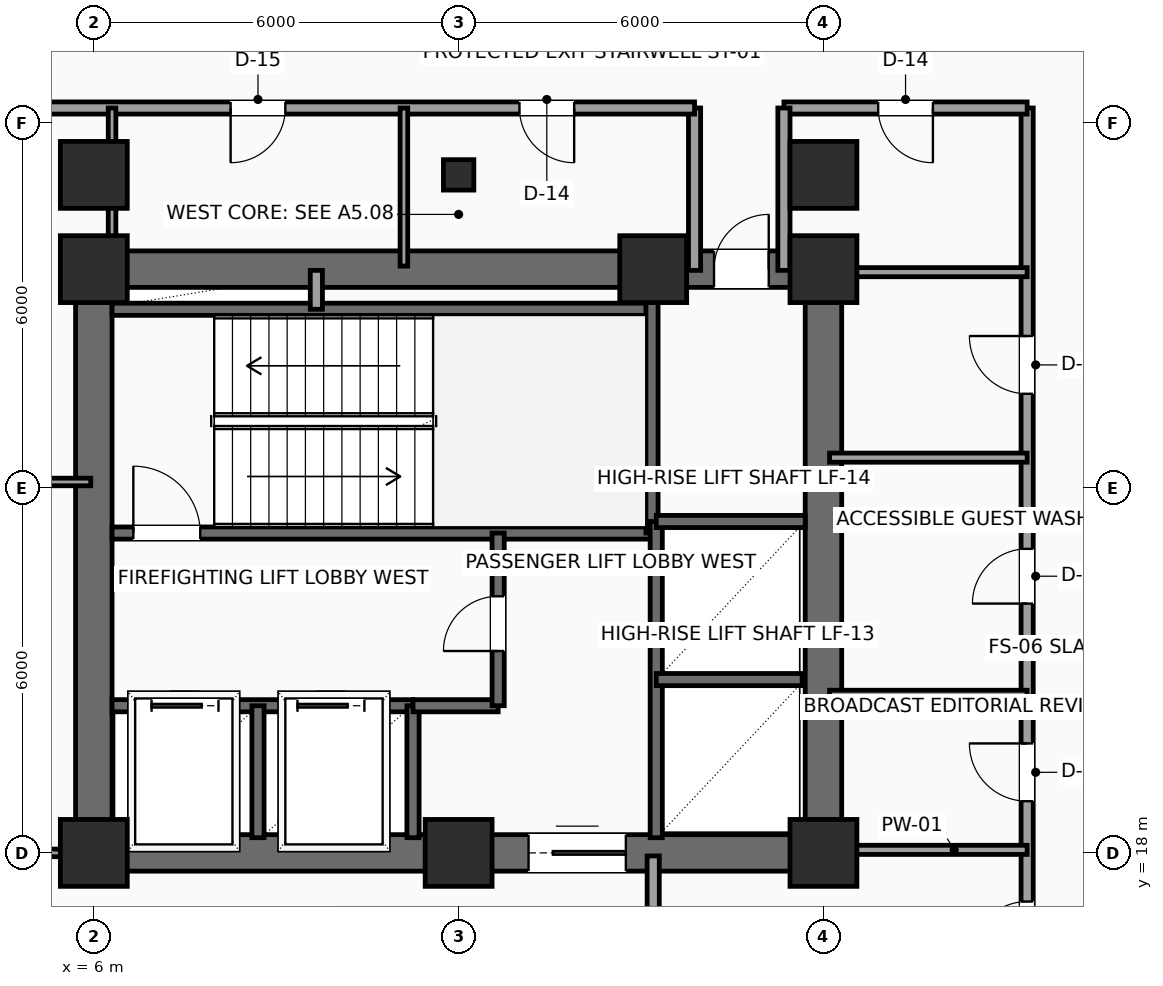
"""IFC4 building model, lengths in metres.
Left out: names, types, materials, properties, quantities, classifications, styles, units other than length and angle.
Written with IfcOpenShell. Run it as: python <this file> out.ifc"""

import sys

from ifc_helpers import new_model, si_unit, direction, frame, frame_2d, origin, origin_2d, place, context, subcontext, project, spatial, rectangle, hollow_rectangle, extrude, element, fill, save


model = new_model("IFC4")
c1 = context("Model", 3, precision=1e-05, world=origin(), true_north=direction((0.0, 1.0)))
c2 = subcontext(c1, "Body", "Model", "MODEL_VIEW")
j1 = project(units=[si_unit("LENGTHUNIT", "METRE"), si_unit("PLANEANGLEUNIT", "RADIAN")], contexts=[c1])
p1 = place(None, origin())
s1 = spatial("IfcSite", under=j1, at=p1, CompositionType="ELEMENT")
p2 = place(p1, origin())
s2 = spatial("IfcBuilding", under=s1, at=p2, CompositionType="ELEMENT")
p3 = place(p2, frame((0.0, 0.0, 149.4)))
s3 = spatial("IfcBuildingStorey", under=s2, at=p3, CompositionType="ELEMENT", Elevation=149.4)
for number, where, z_axis, x_axis in (
    (1, (6.0, 18.0, 0.0), (0.0, 0.0, 1.0), (1.0, 0.0, 0.0)),
    (2, (12.0, 18.0, 0.0), (0.0, 0.0, 1.0), (1.0, 0.0, 0.0)),
    (3, (18.0, 18.0, 0.0), (0.0, 0.0, 1.0), (1.0, 0.0, 0.0)),
    (4, (6.0, 27.6, 0.0), (0.0, 0.0, 1.0), (1.0, 0.0, 0.0)),
    (5, (15.2, 27.6, 0.0), (0.0, 0.0, 1.0), (1.0, 0.0, 0.0)),
    (6, (18.0, 27.6, 0.0), (0.0, 0.0, 1.0), (1.0, 0.0, 0.0)),
    (7, (6.0, 29.15, 0.0), (0.0, 0.0, 1.0), (1.0, 0.0, 0.0)),
):
    element("IfcColumn", number, at=place(p3, frame(where, z_axis=z_axis, x_axis=x_axis)), inside=s3, PredefinedType="COLUMN", context=c2, shape_type="SweptSolid", body=[
        extrude(rectangle(XDim=1.1, YDim=1.1, at=origin_2d()), origin(), (0.0, 0.0, 1.0), 3.75),
    ])
p4 = place(p3, frame((12.0, 29.15, 0.0), z_axis=(0.0, 0.0, 1.0), x_axis=(1.0, 0.0, 0.0)))
e8 = element("IfcColumn", 8, at=p4, inside=s3, PredefinedType="COLUMN", context=c2, shape_type="SweptSolid", body=[
    extrude(hollow_rectangle(XDim=0.5, YDim=0.5, WallThickness=0.025, InnerFilletRadius=0.025, OuterFilletRadius=0.04, at=origin_2d()), origin(), (0.0, 0.0, 1.0), 3.75),
])
p5 = place(p3, frame((18.0, 29.15, 0.0), z_axis=(0.0, 0.0, 1.0), x_axis=(1.0, 0.0, 0.0)))
e9 = element("IfcColumn", 9, at=p5, inside=s3, PredefinedType="COLUMN", context=c2, shape_type="SweptSolid", body=[
    extrude(rectangle(XDim=1.1, YDim=1.1, at=origin_2d()), origin(), (0.0, 0.0, 1.0), 3.75),
])
p6 = place(p3, frame((6.0, 18.0, 0.0), z_axis=(0.0, 0.0, 1.0), x_axis=(1.0, 0.0, 0.0)))
e10 = element("IfcWall", 10, at=p6, inside=s3, PredefinedType="SHEAR", context=c2, shape_type="SweptSolid", body=[
    extrude(rectangle(XDim=12.0, YDim=0.6, at=frame_2d((6.0, 0.0))), origin(), (0.0, 0.0, 1.0), 3.525),
])
p7 = place(p6, frame((7.15, 0.0, 0.0)))
e11 = element("IfcOpeningElement", 11, at=p7, cuts=e10, PredefinedType="OPENING", context=c2, shape_type="SweptSolid", body=[
    extrude(rectangle(XDim=1.6, YDim=2.3, at=frame_2d((0.8, 1.15))), frame((0.0, 0.31, 0.0), z_axis=(0.0, -1.0, 0.0), x_axis=(1.0, 0.0, 0.0)), (0.0, 0.0, 1.0), 0.62),
])
p8 = place(p3, frame((6.0, 27.6, 0.0), z_axis=(0.0, 0.0, 1.0), x_axis=(1.0, 0.0, 0.0)))
e12 = element("IfcWall", 12, at=p8, inside=s3, PredefinedType="SHEAR", context=c2, shape_type="SweptSolid", body=[
    extrude(rectangle(XDim=12.0, YDim=0.6, at=frame_2d((6.0, 0.0))), origin(), (0.0, 0.0, 1.0), 3.525),
])
p9 = place(p8, frame((10.2, 0.0, 0.0)))
e13 = element("IfcOpeningElement", 13, at=p9, cuts=e12, PredefinedType="OPENING", context=c2, shape_type="SweptSolid", body=[
    extrude(rectangle(XDim=0.9, YDim=2.15, at=frame_2d((0.45, 1.075))), frame((0.0, 0.31, 0.0), z_axis=(0.0, -1.0, 0.0), x_axis=(1.0, 0.0, 0.0)), (0.0, 0.0, 1.0), 0.62),
])
for number, where, z_axis, x_axis in (
    (14, (6.0, 18.0, 0.0), (0.0, 0.0, 1.0), (0.0, 1.0, 0.0)),
    (15, (18.0, 18.0, 0.0), (0.0, 0.0, 1.0), (0.0, 1.0, 0.0)),
):
    element("IfcWall", number, at=place(p3, frame(where, z_axis=z_axis, x_axis=x_axis)), inside=s3, PredefinedType="SHEAR", context=c2, shape_type="SweptSolid", body=[
        extrude(rectangle(XDim=9.6, YDim=0.6, at=frame_2d((4.8, 0.0))), origin(), (0.0, 0.0, 1.0), 3.525),
    ])
p10 = place(p3, frame((6.3, 23.26, 0.0), z_axis=(0.0, 0.0, 1.0), x_axis=(1.0, 0.0, 0.0)))
e16 = element("IfcWall", 16, at=p10, inside=s3, PredefinedType="SHEAR", context=c2, shape_type="SweptSolid", body=[
    extrude(rectangle(XDim=8.88, YDim=0.2, at=frame_2d((4.44, 0.0))), origin(), (0.0, 0.0, 1.0), 3.525),
])
p11 = place(p10, frame((0.35, 0.0, 0.0)))
e17 = element("IfcOpeningElement", 17, at=p11, cuts=e16, PredefinedType="OPENING", context=c2, shape_type="SweptSolid", body=[
    extrude(rectangle(XDim=1.1, YDim=2.2, at=frame_2d((0.55, 1.1))), frame((0.0, 0.11, 0.0), z_axis=(0.0, -1.0, 0.0), x_axis=(1.0, 0.0, 0.0)), (0.0, 0.0, 1.0), 0.22),
])
p12 = place(p3, frame((6.3, 26.94, 0.0), z_axis=(0.0, 0.0, 1.0), x_axis=(1.0, 0.0, 0.0)))
e18 = element("IfcWall", 18, at=p12, inside=s3, PredefinedType="SHEAR", context=c2, shape_type="SweptSolid", body=[
    extrude(rectangle(XDim=8.88, YDim=0.2, at=frame_2d((4.44, 0.0))), origin(), (0.0, 0.0, 1.0), 3.525),
])
p13 = place(p3, frame((15.18, 23.26, 0.0), z_axis=(0.0, 0.0, 1.0), x_axis=(0.0, 1.0, 0.0)))
e19 = element("IfcWall", 19, at=p13, inside=s3, PredefinedType="SHEAR", context=c2, shape_type="SweptSolid", body=[
    extrude(rectangle(XDim=4.04, YDim=0.2, at=frame_2d((2.02, 0.0))), origin(), (0.0, 0.0, 1.0), 3.525),
])
p14 = place(p3, frame((6.3, 20.42, 0.0), z_axis=(0.0, 0.0, 1.0), x_axis=(1.0, 0.0, 0.0)))
e20 = element("IfcWall", 20, at=p14, inside=s3, PredefinedType="SHEAR", context=c2, shape_type="SweptSolid", body=[
    extrude(rectangle(XDim=4.95, YDim=0.2, at=frame_2d((2.475, 0.0))), origin(), (0.0, 0.0, 1.0), 3.525),
])
p15 = place(p14, frame((0.65, 0.0, 0.0)))
e21 = element("IfcOpeningElement", 21, at=p15, cuts=e20, PredefinedType="OPENING", context=c2, shape_type="SweptSolid", body=[
    extrude(rectangle(XDim=1.1, YDim=2.2, at=frame_2d((0.55, 1.1))), frame((0.0, 0.11, 0.0), z_axis=(0.0, -1.0, 0.0), x_axis=(1.0, 0.0, 0.0)), (0.0, 0.0, 1.0), 0.22),
])
p16 = place(p14, frame((3.05, 0.0, 0.0)))
e22 = element("IfcOpeningElement", 22, at=p16, cuts=e20, PredefinedType="OPENING", context=c2, shape_type="SweptSolid", body=[
    extrude(rectangle(XDim=1.1, YDim=2.2, at=frame_2d((0.55, 1.1))), frame((0.0, 0.11, 0.0), z_axis=(0.0, -1.0, 0.0), x_axis=(1.0, 0.0, 0.0)), (0.0, 0.0, 1.0), 0.22),
])
for number, where, z_axis, x_axis in (
    (23, (8.7, 18.25, 0.0), (0.0, 0.0, 1.0), (0.0, 1.0, 0.0)),
    (24, (11.25, 18.25, 0.0), (0.0, 0.0, 1.0), (0.0, 1.0, 0.0)),
):
    element("IfcWall", number, at=place(p3, frame(where, z_axis=z_axis, x_axis=x_axis)), inside=s3, PredefinedType="SHEAR", context=c2, shape_type="SweptSolid", body=[
        extrude(rectangle(XDim=2.17, YDim=0.2, at=frame_2d((1.085, 0.0))), origin(), (0.0, 0.0, 1.0), 3.525),
    ])
p17 = place(p3, frame((11.25, 20.42, 0.0), z_axis=(0.0, 0.0, 1.0), x_axis=(1.0, 0.0, 0.0)))
e25 = element("IfcWall", 25, at=p17, inside=s3, PredefinedType="SHEAR", context=c2, shape_type="SweptSolid", body=[
    extrude(rectangle(XDim=1.4, YDim=0.2, at=frame_2d((0.7, 0.0))), origin(), (0.0, 0.0, 1.0), 3.525),
])
p18 = place(p3, frame((12.65, 20.42, 0.0), z_axis=(0.0, 0.0, 1.0), x_axis=(0.0, 1.0, 0.0)))
e26 = element("IfcWall", 26, at=p18, inside=s3, PredefinedType="SHEAR", context=c2, shape_type="SweptSolid", body=[
    extrude(rectangle(XDim=2.84, YDim=0.2, at=frame_2d((1.42, 0.0))), origin(), (0.0, 0.0, 1.0), 3.525),
])
p19 = place(p18, frame((0.9, 0.0, 0.0)))
e27 = element("IfcOpeningElement", 27, at=p19, cuts=e26, PredefinedType="OPENING", context=c2, shape_type="SweptSolid", body=[
    extrude(rectangle(XDim=0.9, YDim=2.15, at=frame_2d((0.45, 1.075))), frame((0.0, 0.11, 0.0), z_axis=(0.0, -1.0, 0.0), x_axis=(1.0, 0.0, 0.0)), (0.0, 0.0, 1.0), 0.22),
])
p20 = place(p3, frame((9.66, 26.94, 0.0), z_axis=(0.0, 0.0, 1.0), x_axis=(0.0, 1.0, 0.0)))
e28 = element("IfcWall", 28, at=p20, inside=s3, PredefinedType="SOLIDWALL", context=c2, shape_type="SweptSolid", body=[
    extrude(rectangle(XDim=0.64, YDim=0.2, at=frame_2d((0.32, 0.0))), origin(), (0.0, 0.0, 1.0), 3.525),
])
p21 = place(p3, frame((15.25, 18.25, 0.0), z_axis=(0.0, 0.0, 1.0), x_axis=(0.0, 1.0, 0.0)))
e29 = element("IfcWall", 29, at=p21, inside=s3, PredefinedType="SHEAR", context=c2, shape_type="SweptSolid", body=[
    extrude(rectangle(XDim=5.2, YDim=0.2, at=frame_2d((2.6, 0.0))), origin(), (0.0, 0.0, 1.0), 3.525),
])
p22 = place(p3, frame((15.25, 20.85, 0.0), z_axis=(0.0, 0.0, 1.0), x_axis=(1.0, 0.0, 0.0)))
e30 = element("IfcWall", 30, at=p22, inside=s3, PredefinedType="SHEAR", context=c2, shape_type="SweptSolid", body=[
    extrude(rectangle(XDim=2.4, YDim=0.2, at=frame_2d((1.2, 0.0))), origin(), (0.0, 0.0, 1.0), 3.525),
])
p23 = place(p3, frame((15.25, 23.45, 0.0), z_axis=(0.0, 0.0, 1.0), x_axis=(1.0, 0.0, 0.0)))
e31 = element("IfcWall", 31, at=p23, inside=s3, PredefinedType="SHEAR", context=c2, shape_type="SweptSolid", body=[
    extrude(rectangle(XDim=2.45, YDim=0.2, at=frame_2d((1.225, 0.0))), origin(), (0.0, 0.0, 1.0), 3.525),
])
p24 = place(p3, frame((15.2, 17.95, 0.0), z_axis=(0.0, 0.0, 1.0), x_axis=(0.0, -1.0, 0.0)))
e32 = element("IfcWall", 32, at=p24, inside=s3, PredefinedType="SOLIDWALL", context=c2, shape_type="SweptSolid", body=[
    extrude(rectangle(XDim=2.4, YDim=0.2, at=frame_2d((1.2, 0.0))), origin(), (0.0, 0.0, 1.0), 3.525),
])
p25 = place(p3, frame((21.35, 11.65, 0.0), z_axis=(0.0, 0.0, 1.0), x_axis=(0.0, 1.0, 0.0)))
e33 = element("IfcWall", 33, at=p25, inside=s3, PredefinedType="SOLIDWALL", context=c2, shape_type="SweptSolid", body=[
    extrude(rectangle(XDim=18.6, YDim=0.2, at=frame_2d((9.3, 0.0))), origin(), (0.0, 0.0, 1.0), 3.525),
])
p26 = place(p25, frame((7.2, 0.0, 0.0)))
e34 = element("IfcOpeningElement", 34, at=p26, cuts=e33, PredefinedType="OPENING", context=c2, shape_type="SweptSolid", body=[
    extrude(rectangle(XDim=0.95, YDim=2.15, at=frame_2d((0.475, 1.075))), frame((0.0, 0.11, 0.0), z_axis=(0.0, -1.0, 0.0), x_axis=(1.0, 0.0, 0.0)), (0.0, 0.0, 1.0), 0.22),
])
p27 = place(p25, frame((10.45, 0.0, 0.0)))
e35 = element("IfcOpeningElement", 35, at=p27, cuts=e33, PredefinedType="OPENING", context=c2, shape_type="SweptSolid", body=[
    extrude(rectangle(XDim=0.9, YDim=2.1, at=frame_2d((0.45, 1.05))), frame((0.0, 0.11, 0.0), z_axis=(0.0, -1.0, 0.0), x_axis=(1.0, 0.0, 0.0)), (0.0, 0.0, 1.0), 0.22),
])
p28 = place(p25, frame((13.9, 0.0, 0.0)))
e36 = element("IfcOpeningElement", 36, at=p28, cuts=e33, PredefinedType="OPENING", context=c2, shape_type="SweptSolid", body=[
    extrude(rectangle(XDim=0.95, YDim=2.15, at=frame_2d((0.475, 1.075))), frame((0.0, 0.11, 0.0), z_axis=(0.0, -1.0, 0.0), x_axis=(1.0, 0.0, 0.0)), (0.0, 0.0, 1.0), 0.22),
])
p29 = place(p25, frame((4.65, 0.0, 0.0)))
e37 = element("IfcOpeningElement", 37, at=p29, cuts=e33, PredefinedType="OPENING", context=c2, shape_type="SweptSolid", body=[
    extrude(rectangle(XDim=0.9, YDim=2.1, at=frame_2d((0.45, 1.05))), frame((0.0, 0.11, 0.0), z_axis=(0.0, -1.0, 0.0), x_axis=(1.0, 0.0, 0.0)), (0.0, 0.0, 1.0), 0.22),
])
p30 = place(p3, frame((21.35, 30.25, 0.0), z_axis=(0.0, 0.0, 1.0), x_axis=(-1.0, 0.0, 0.0)))
e38 = element("IfcWall", 38, at=p30, inside=s3, PredefinedType="SOLIDWALL", context=c2, shape_type="SweptSolid", body=[
    extrude(rectangle(XDim=4.0, YDim=0.2, at=frame_2d((2.0, 0.0))), origin(), (0.0, 0.0, 1.0), 3.525),
])
p31 = place(p30, frame((1.55, 0.0, 0.0)))
e39 = element("IfcOpeningElement", 39, at=p31, cuts=e38, PredefinedType="OPENING", context=c2, shape_type="SweptSolid", body=[
    extrude(rectangle(XDim=0.9, YDim=2.1, at=frame_2d((0.45, 1.05))), frame((0.0, 0.11, 0.0), z_axis=(0.0, -1.0, 0.0), x_axis=(1.0, 0.0, 0.0)), (0.0, 0.0, 1.0), 0.22),
])
for number, where, z_axis, x_axis in (
    (40, (17.35, 30.25, 0.0), (0.0, 0.0, 1.0), (0.0, -1.0, 0.0)),
    (41, (15.88, 27.58, 0.0), (0.0, 0.0, 1.0), (0.0, 1.0, 0.0)),
):
    element("IfcWall", number, at=place(p3, frame(where, z_axis=z_axis, x_axis=x_axis)), inside=s3, PredefinedType="SOLIDWALL", context=c2, shape_type="SweptSolid", body=[
        extrude(rectangle(XDim=2.67, YDim=0.2, at=frame_2d((1.335, 0.0))), origin(), (0.0, 0.0, 1.0), 3.525),
    ])
p32 = place(p3, frame((15.88, 30.25, 0.0), z_axis=(0.0, 0.0, 1.0), x_axis=(-1.0, 0.0, 0.0)))
e42 = element("IfcWall", 42, at=p32, inside=s3, PredefinedType="SOLIDWALL", context=c2, shape_type="SweptSolid", body=[
    extrude(rectangle(XDim=15.58, YDim=0.2, at=frame_2d((7.79, 0.0))), origin(), (0.0, 0.0, 1.0), 3.525),
])
p33 = place(p32, frame((12.28, 0.0, 0.0)))
e43 = element("IfcOpeningElement", 43, at=p33, cuts=e42, PredefinedType="OPENING", context=c2, shape_type="SweptSolid", body=[
    extrude(rectangle(XDim=0.9, YDim=2.1, at=frame_2d((0.45, 1.05))), frame((0.0, 0.11, 0.0), z_axis=(0.0, -1.0, 0.0), x_axis=(1.0, 0.0, 0.0)), (0.0, 0.0, 1.0), 0.22),
])
p34 = place(p32, frame((6.73, 0.0, 0.0)))
e44 = element("IfcOpeningElement", 44, at=p34, cuts=e42, PredefinedType="OPENING", context=c2, shape_type="SweptSolid", body=[
    extrude(rectangle(XDim=0.9, YDim=2.1, at=frame_2d((0.45, 1.05))), frame((0.0, 0.11, 0.0), z_axis=(0.0, -1.0, 0.0), x_axis=(1.0, 0.0, 0.0)), (0.0, 0.0, 1.0), 0.22),
])
p35 = place(p32, frame((1.98, 0.0, 0.0)))
e45 = element("IfcOpeningElement", 45, at=p35, cuts=e42, PredefinedType="OPENING", context=c2, shape_type="SweptSolid", body=[
    extrude(rectangle(XDim=0.9, YDim=2.1, at=frame_2d((0.45, 1.05))), frame((0.0, 0.11, 0.0), z_axis=(0.0, -1.0, 0.0), x_axis=(1.0, 0.0, 0.0)), (0.0, 0.0, 1.0), 0.22),
])
p36 = place(p3, frame((18.1, 18.05, 0.0), z_axis=(0.0, 0.0, 1.0), x_axis=(1.0, 0.0, 0.0)))
e46 = element("IfcWall", 46, at=p36, inside=s3, PredefinedType="PARTITIONING", context=c2, shape_type="SweptSolid", body=[
    extrude(rectangle(XDim=3.25, YDim=0.15, at=frame_2d((1.625, 0.0))), origin(), (0.0, 0.0, 1.0), 3.017),
])
for number, where, z_axis, x_axis in (
    (47, (18.1, 20.6, 0.0), (0.0, 0.0, 1.0), (1.0, 0.0, 0.0)),
    (48, (18.1, 24.5, 0.0), (0.0, 0.0, 1.0), (1.0, 0.0, 0.0)),
    (49, (18.1, 27.55, 0.0), (0.0, 0.0, 1.0), (1.0, 0.0, 0.0)),
):
    element("IfcWall", number, at=place(p3, frame(where, z_axis=z_axis, x_axis=x_axis)), inside=s3, PredefinedType="PARTITIONING", context=c2, shape_type="SweptSolid", body=[
        extrude(rectangle(XDim=3.25, YDim=0.15, at=frame_2d((1.625, 0.0))), origin(), (0.0, 0.0, 1.0), 3.525),
    ])
p37 = place(p3, frame((0.3, 18.0, 0.0), z_axis=(0.0, 0.0, 1.0), x_axis=(1.0, 0.0, 0.0)))
e50 = element("IfcWall", 50, at=p37, inside=s3, PredefinedType="PARTITIONING", context=c2, shape_type="SweptSolid", body=[
    extrude(rectangle(XDim=5.65, YDim=0.125, at=frame_2d((2.825, 0.0))), origin(), (0.0, 0.0, 1.0), 3.017),
])
p38 = place(p37, frame((2.4, 0.0, 0.0)))
e51 = element("IfcOpeningElement", 51, at=p38, cuts=e50, PredefinedType="OPENING", context=c2, shape_type="SweptSolid", body=[
    extrude(rectangle(XDim=0.9, YDim=2.1, at=frame_2d((0.45, 1.05))), frame((0.0, 0.073, 0.0), z_axis=(0.0, -1.0, 0.0), x_axis=(1.0, 0.0, 0.0)), (0.0, 0.0, 1.0), 0.145),
])
p39 = place(p3, frame((0.3, 24.1, 0.0), z_axis=(0.0, 0.0, 1.0), x_axis=(1.0, 0.0, 0.0)))
e52 = element("IfcWall", 52, at=p39, inside=s3, PredefinedType="PARTITIONING", context=c2, shape_type="SweptSolid", body=[
    extrude(rectangle(XDim=5.65, YDim=0.125, at=frame_2d((2.825, 0.0))), origin(), (0.0, 0.0, 1.0), 3.525),
])
for number, where, z_axis, x_axis in (
    (53, (6.3, 27.65, 0.0), (0.0, 0.0, 1.0), (0.0, 1.0, 0.0)),
    (54, (11.1, 27.65, 0.0), (0.0, 0.0, 1.0), (0.0, 1.0, 0.0)),
):
    element("IfcWall", number, at=place(p3, frame(where, z_axis=z_axis, x_axis=x_axis)), inside=s3, PredefinedType="PARTITIONING", context=c2, shape_type="SweptSolid", body=[
        extrude(rectangle(XDim=2.6, YDim=0.125, at=frame_2d((1.3, 0.0))), origin(), (0.0, 0.0, 1.0), 3.525),
    ])
p40 = place(p7, origin())
e55 = element("IfcDoor", 55, at=p40, inside=s3, OperationType="DOUBLE_DOOR_SLIDING", PredefinedType="DOOR", context=c2, shape_type="SweptSolid", body=[
    extrude(rectangle(XDim=1.6, YDim=2.3, at=frame_2d((0.8, 1.15))), frame((0.0, 0.025, 0.0), z_axis=(0.0, -1.0, 0.0), x_axis=(1.0, 0.0, 0.0)), (0.0, 0.0, 1.0), 0.05),
])
fill(e11, e55)
p41 = place(p9, origin())
e56 = element("IfcDoor", 56, at=p41, inside=s3, OperationType="SINGLE_SWING_RIGHT", PredefinedType="DOOR", context=c2, shape_type="SweptSolid", body=[
    extrude(rectangle(XDim=0.9, YDim=2.15, at=frame_2d((0.45, 1.075))), frame((0.0, 0.025, 0.0), z_axis=(0.0, -1.0, 0.0), x_axis=(1.0, 0.0, 0.0)), (0.0, 0.0, 1.0), 0.05),
])
fill(e13, e56)
p42 = place(p11, origin())
e57 = element("IfcDoor", 57, at=p42, inside=s3, OperationType="SINGLE_SWING_LEFT", PredefinedType="DOOR", context=c2, shape_type="SweptSolid", body=[
    extrude(rectangle(XDim=1.1, YDim=2.2, at=frame_2d((0.55, 1.1))), frame((0.0, 0.025, 0.0), z_axis=(0.0, -1.0, 0.0), x_axis=(1.0, 0.0, 0.0)), (0.0, 0.0, 1.0), 0.05),
])
fill(e17, e57)
p43 = place(p15, origin())
e58 = element("IfcDoor", 58, at=p43, inside=s3, OperationType="SLIDING_TO_LEFT", PredefinedType="DOOR", context=c2, shape_type="SweptSolid", body=[
    extrude(rectangle(XDim=1.1, YDim=2.2, at=frame_2d((0.55, 1.1))), frame((0.0, 0.025, 0.0), z_axis=(0.0, -1.0, 0.0), x_axis=(1.0, 0.0, 0.0)), (0.0, 0.0, 1.0), 0.05),
])
fill(e21, e58)
p44 = place(p16, origin())
e59 = element("IfcDoor", 59, at=p44, inside=s3, OperationType="SLIDING_TO_LEFT", PredefinedType="DOOR", context=c2, shape_type="SweptSolid", body=[
    extrude(rectangle(XDim=1.1, YDim=2.2, at=frame_2d((0.55, 1.1))), frame((0.0, 0.025, 0.0), z_axis=(0.0, -1.0, 0.0), x_axis=(1.0, 0.0, 0.0)), (0.0, 0.0, 1.0), 0.05),
])
fill(e22, e59)
p45 = place(p19, origin())
e60 = element("IfcDoor", 60, at=p45, inside=s3, OperationType="SINGLE_SWING_LEFT", PredefinedType="DOOR", context=c2, shape_type="SweptSolid", body=[
    extrude(rectangle(XDim=0.9, YDim=2.15, at=frame_2d((0.45, 1.075))), frame((0.0, 0.025, 0.0), z_axis=(0.0, -1.0, 0.0), x_axis=(1.0, 0.0, 0.0)), (0.0, 0.0, 1.0), 0.05),
])
fill(e27, e60)
p46 = place(p26, origin())
e61 = element("IfcDoor", 61, at=p46, inside=s3, OperationType="SINGLE_SWING_RIGHT", PredefinedType="DOOR", context=c2, shape_type="SweptSolid", body=[
    extrude(rectangle(XDim=0.95, YDim=2.15, at=frame_2d((0.475, 1.075))), frame((0.0, 0.025, 0.0), z_axis=(0.0, -1.0, 0.0), x_axis=(1.0, 0.0, 0.0)), (0.0, 0.0, 1.0), 0.05),
])
fill(e34, e61)
p47 = place(p27, origin())
e62 = element("IfcDoor", 62, at=p47, inside=s3, OperationType="SINGLE_SWING_LEFT", PredefinedType="DOOR", context=c2, shape_type="SweptSolid", body=[
    extrude(rectangle(XDim=0.9, YDim=2.1, at=frame_2d((0.45, 1.05))), frame((0.0, 0.025, 0.0), z_axis=(0.0, -1.0, 0.0), x_axis=(1.0, 0.0, 0.0)), (0.0, 0.0, 1.0), 0.05),
])
fill(e35, e62)
p48 = place(p28, origin())
e63 = element("IfcDoor", 63, at=p48, inside=s3, OperationType="SINGLE_SWING_RIGHT", PredefinedType="DOOR", context=c2, shape_type="SweptSolid", body=[
    extrude(rectangle(XDim=0.95, YDim=2.15, at=frame_2d((0.475, 1.075))), frame((0.0, 0.025, 0.0), z_axis=(0.0, -1.0, 0.0), x_axis=(1.0, 0.0, 0.0)), (0.0, 0.0, 1.0), 0.05),
])
fill(e36, e63)
p49 = place(p29, origin())
e64 = element("IfcDoor", 64, at=p49, inside=s3, OperationType="SINGLE_SWING_LEFT", PredefinedType="DOOR", context=c2, shape_type="SweptSolid", body=[
    extrude(rectangle(XDim=0.9, YDim=2.1, at=frame_2d((0.45, 1.05))), frame((0.0, 0.025, 0.0), z_axis=(0.0, -1.0, 0.0), x_axis=(1.0, 0.0, 0.0)), (0.0, 0.0, 1.0), 0.05),
])
fill(e37, e64)
p50 = place(p31, origin())
e65 = element("IfcDoor", 65, at=p50, inside=s3, OperationType="SINGLE_SWING_LEFT", PredefinedType="DOOR", context=c2, shape_type="SweptSolid", body=[
    extrude(rectangle(XDim=0.9, YDim=2.1, at=frame_2d((0.45, 1.05))), frame((0.0, 0.025, 0.0), z_axis=(0.0, -1.0, 0.0), x_axis=(1.0, 0.0, 0.0)), (0.0, 0.0, 1.0), 0.05),
])
fill(e39, e65)
p51 = place(p34, origin())
e66 = element("IfcDoor", 66, at=p51, inside=s3, OperationType="SINGLE_SWING_RIGHT", PredefinedType="DOOR", context=c2, shape_type="SweptSolid", body=[
    extrude(rectangle(XDim=0.9, YDim=2.1, at=frame_2d((0.45, 1.05))), frame((0.0, 0.025, 0.0), z_axis=(0.0, -1.0, 0.0), x_axis=(1.0, 0.0, 0.0)), (0.0, 0.0, 1.0), 0.05),
])
fill(e44, e66)
p52 = place(p35, origin())
e67 = element("IfcDoor", 67, at=p52, inside=s3, OperationType="SINGLE_SWING_LEFT", PredefinedType="DOOR", context=c2, shape_type="SweptSolid", body=[
    extrude(rectangle(XDim=0.9, YDim=2.1, at=frame_2d((0.45, 1.05))), frame((0.0, 0.025, 0.0), z_axis=(0.0, -1.0, 0.0), x_axis=(1.0, 0.0, 0.0)), (0.0, 0.0, 1.0), 0.05),
])
fill(e45, e67)
save(model, sys.argv[1])
